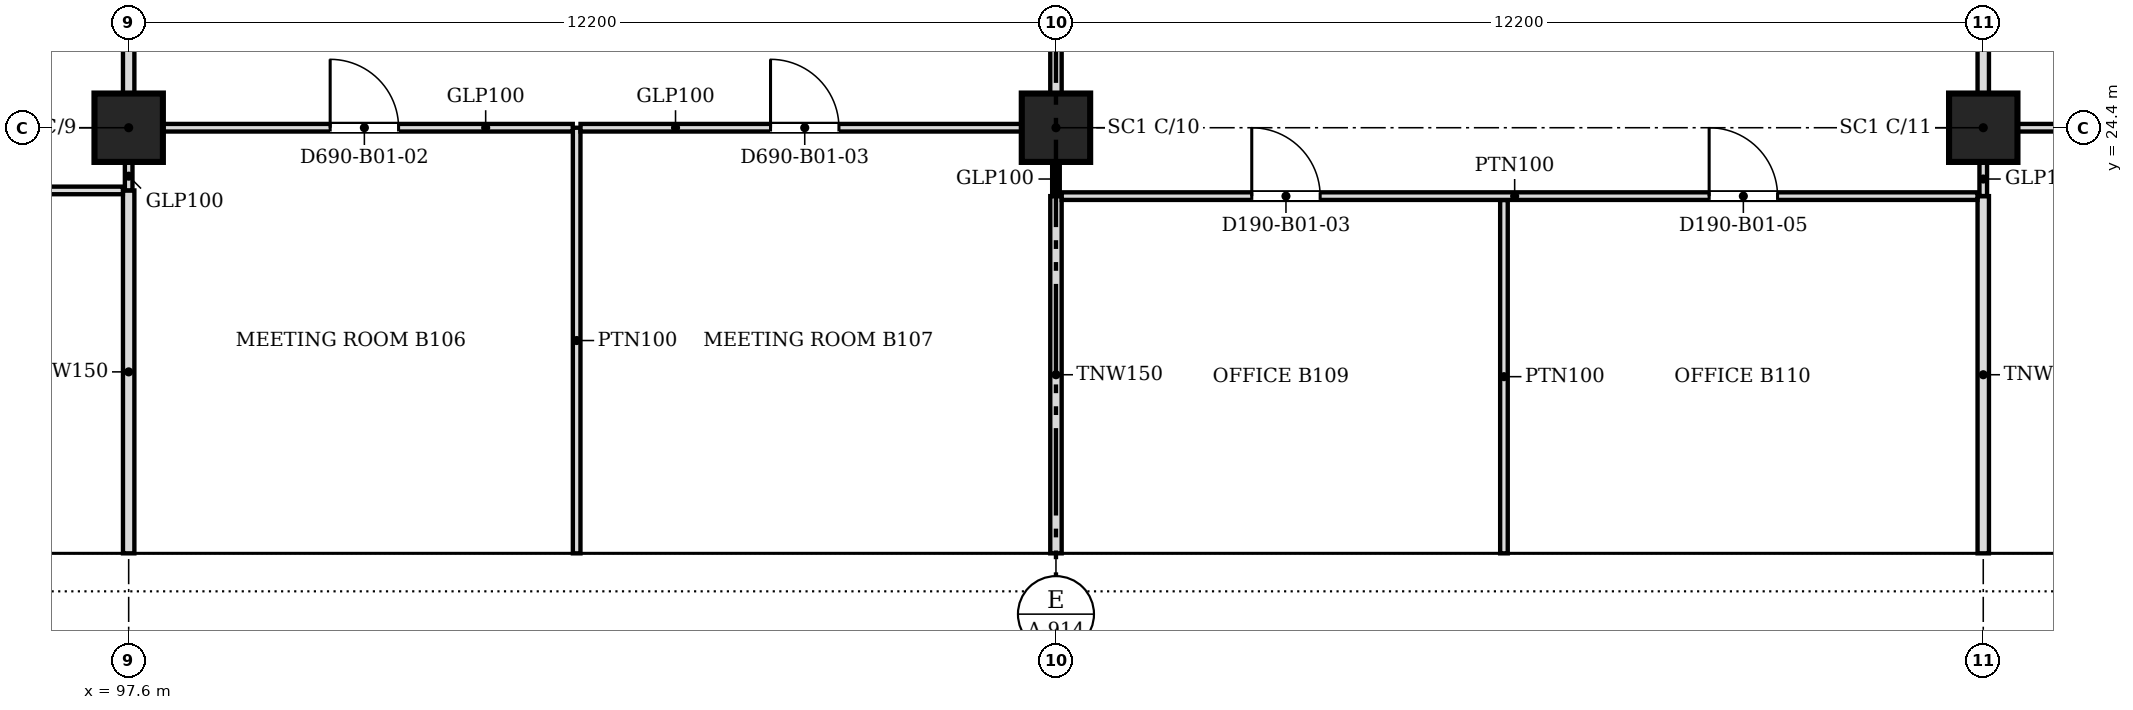
"""IFC4 building model, lengths in metres.
Left out: names, types, materials, properties, quantities, classifications, styles, units other than length and angle.
Written with IfcOpenShell. Run it as: python <this file> out.ifc"""

import sys

from ifc_helpers import new_model, si_unit, direction, frame, frame_2d, origin, origin_2d, place, context, subcontext, project, spatial, polyline, rectangle, outline, extrude, faceted_brep, source, transform, mapped, element, fill, save


model = new_model("IFC4")
c1 = context("Model", 3, precision=1e-05, world=origin(), true_north=direction((0.0, 1.0)))
c2 = subcontext(c1, "Body", "Model", "MODEL_VIEW")
j1 = project(units=[si_unit("LENGTHUNIT", "METRE"), si_unit("PLANEANGLEUNIT", "RADIAN")], contexts=[c1])
p1 = place(None, origin())
s1 = spatial("IfcSite", under=j1, at=p1, CompositionType="ELEMENT")
p2 = place(p1, origin())
s2 = spatial("IfcBuilding", under=s1, at=p2, CompositionType="ELEMENT")
p3 = place(p2, frame((0.0, 0.0, 16.8)))
s3 = spatial("IfcBuildingStorey", under=s2, at=p3, CompositionType="ELEMENT", Elevation=16.8)
for number, where, z_axis, x_axis in (
    (1, (97.6, 24.4, 0.0), (0.0, 0.0, 1.0), (1.0, 0.0, 0.0)),
    (2, (109.8, 24.4, 0.0), (0.0, 0.0, 1.0), (1.0, 0.0, 0.0)),
    (3, (122.0, 24.4, 0.0), (0.0, 0.0, 1.0), (1.0, 0.0, 0.0)),
):
    element("IfcColumn", number, at=place(p3, frame(where, z_axis=z_axis, x_axis=x_axis)), inside=s3, PredefinedType="COLUMN", context=c2, shape_type="SweptSolid", body=[
        extrude(rectangle(XDim=0.9, YDim=0.9, at=origin_2d()), origin(), (0.0, 0.0, 1.0), 4.3),
    ])
m1 = source(origin(), c2, "Body", "Brep", [
    faceted_brep([(6.1, -0.25, 0.0), (3.05, -0.25, 4.5), (0.0, -0.25, 0.0), (6.1, -0.25, 0.0), (0.0, 0.25, 0.0), (3.05, 0.25, 4.5), (6.1, 0.25, 0.0), (6.1, 0.25, 0.0)], [[[0, 1, 2, 3]], [[4, 5, 6, 7]], [[6, 5, 1, 0]], [[5, 4, 2, 1]], [[4, 7, 3, 2]], [[3, 7, 6, 0]]]),
])
p4 = place(p3, frame((94.55, 18.55, 0.0), z_axis=(0.0, 0.0, 1.0), x_axis=(1.0, 0.0, 0.0)))
e4 = element("IfcWall", 4, at=p4, inside=s3, PredefinedType="SOLIDWALL", context=c2, shape_type="MappedRepresentation", body=[
    mapped(m1, transform((0.0, 0.0, 0.0), scale=1.0)),
])
m2 = source(origin(), c2, "Body", "SweptSolid", [
    extrude(outline(polyline([(5.629, 0.25), (3.05, 4.054), (0.471, 0.25), (5.629, 0.25)])), frame((0.0, 0.26, 0.0), z_axis=(0.0, -1.0, 0.0), x_axis=(1.0, 0.0, 0.0)), (0.0, 0.0, 1.0), 0.52),
])
p5 = place(p4, origin())
e5 = element("IfcOpeningElement", 5, at=p5, cuts=e4, PredefinedType="OPENING", context=c2, shape_type="MappedRepresentation", body=[
    mapped(m2, transform((0.0, 0.0, 0.0), scale=1.0)),
])
m3 = source(origin(), c2, "Body", "SweptSolid", [
    extrude(outline(polyline([(6.1, 0.0), (3.05, 4.5), (0.0, 0.0), (6.1, 0.0)])), frame((0.0, 0.25, 0.0), z_axis=(0.0, -1.0, 0.0), x_axis=(1.0, 0.0, 0.0)), (0.0, 0.0, 1.0), 0.5),
])
p6 = place(p3, frame((100.65, 18.55, 0.0), z_axis=(0.0, 0.0, 1.0), x_axis=(1.0, 0.0, 0.0)))
e6 = element("IfcWall", 6, at=p6, inside=s3, PredefinedType="SOLIDWALL", context=c2, shape_type="MappedRepresentation", body=[
    mapped(m3, transform((0.0, 0.0, 0.0), scale=1.0)),
])
p7 = place(p6, origin())
e7 = element("IfcOpeningElement", 7, at=p7, cuts=e6, PredefinedType="OPENING", context=c2, shape_type="MappedRepresentation", body=[
    mapped(m2, transform((0.0, 0.0, 0.0), scale=1.0)),
])
p8 = place(p3, frame((106.75, 18.55, 0.0), z_axis=(0.0, 0.0, 1.0), x_axis=(1.0, 0.0, 0.0)))
e8 = element("IfcWall", 8, at=p8, inside=s3, PredefinedType="SOLIDWALL", context=c2, shape_type="MappedRepresentation", body=[
    mapped(m3, transform((0.0, 0.0, 0.0), scale=1.0)),
])
p9 = place(p8, origin())
e9 = element("IfcOpeningElement", 9, at=p9, cuts=e8, PredefinedType="OPENING", context=c2, shape_type="MappedRepresentation", body=[
    mapped(m2, transform((0.0, 0.0, 0.0), scale=1.0)),
])
p10 = place(p3, frame((112.85, 18.55, 0.0), z_axis=(0.0, 0.0, 1.0), x_axis=(1.0, 0.0, 0.0)))
e10 = element("IfcWall", 10, at=p10, inside=s3, PredefinedType="SOLIDWALL", context=c2, shape_type="MappedRepresentation", body=[
    mapped(m1, transform((0.0, 0.0, 0.0), scale=1.0)),
])
p11 = place(p10, origin())
e11 = element("IfcOpeningElement", 11, at=p11, cuts=e10, PredefinedType="OPENING", context=c2, shape_type="MappedRepresentation", body=[
    mapped(m2, transform((0.0, 0.0, 0.0), scale=1.0)),
])
p12 = place(p3, frame((118.95, 18.55, 0.0), z_axis=(0.0, 0.0, 1.0), x_axis=(1.0, 0.0, 0.0)))
e12 = element("IfcWall", 12, at=p12, inside=s3, PredefinedType="SOLIDWALL", context=c2, shape_type="MappedRepresentation", body=[
    mapped(m3, transform((0.0, 0.0, 0.0), scale=1.0)),
])
p13 = place(p12, origin())
e13 = element("IfcOpeningElement", 13, at=p13, cuts=e12, PredefinedType="OPENING", context=c2, shape_type="MappedRepresentation", body=[
    mapped(m2, transform((0.0, 0.0, 0.0), scale=1.0)),
])
p14 = place(p2, frame((0.0, 0.0, 21.3)))
s4 = spatial("IfcBuildingStorey", under=s2, at=p14, CompositionType="ELEMENT", Elevation=21.3)
m4 = source(origin(), c2, "Body", "Brep", [
    faceted_brep([(3.003, -0.25, 0.0), (6.053, -0.25, 4.5), (3.003, -0.25, 9.0), (0.0, -0.25, 4.5), (0.047, 0.25, 4.57), (3.003, 0.25, 9.0), (6.053, 0.25, 4.5), (3.003, 0.25, 0.0), (0.047, 0.25, 4.43), (0.0, 0.0, 4.5)], [[[0, 1, 2, 3]], [[4, 5, 6, 7, 8]], [[7, 6, 1, 0]], [[6, 5, 2, 1]], [[5, 4, 9, 3, 2]], [[8, 7, 0, 3, 9]], [[8, 9, 4]]]),
])
p15 = place(p14, frame((91.547, 18.55, -4.5), z_axis=(0.0, 0.0, 1.0), x_axis=(1.0, 0.0, 0.0)))
e14 = element("IfcWall", 14, at=p15, inside=s4, PredefinedType="SOLIDWALL", context=c2, shape_type="MappedRepresentation", body=[
    mapped(m4, transform((0.0, 0.0, 0.0), scale=1.0)),
])
m5 = source(origin(), c2, "Body", "SweptSolid", [
    extrude(outline(polyline([(3.005, 0.448), (5.751, 4.5), (3.005, 8.552), (0.301, 4.5), (3.005, 0.448)])), frame((0.0, 0.26, 0.0), z_axis=(0.0, -1.0, 0.0), x_axis=(1.0, 0.0, 0.0)), (0.0, 0.0, 1.0), 0.52),
])
p16 = place(p15, origin())
e15 = element("IfcOpeningElement", 15, at=p16, cuts=e14, PredefinedType="OPENING", context=c2, shape_type="MappedRepresentation", body=[
    mapped(m5, transform((0.0, 0.0, 0.0), scale=1.0)),
])
m6 = source(origin(), c2, "Body", "Brep", [
    faceted_brep([(3.05, -0.25, 0.0), (6.1, -0.25, 4.5), (6.1, -0.25, 4.5), (3.05, -0.25, 9.0), (0.0, -0.25, 4.5), (0.0, 0.25, 4.5), (3.05, 0.25, 9.0), (6.1, 0.25, 4.5), (6.1, 0.25, 4.5), (3.05, 0.25, 0.0)], [[[0, 1, 2, 3, 4]], [[5, 6, 7, 8, 9]], [[9, 8, 1, 0]], [[7, 6, 3, 2]], [[6, 5, 4, 3]], [[5, 9, 0, 4]], [[1, 8, 7, 2]]]),
])
p17 = place(p14, frame((97.6, 18.55, -4.5), z_axis=(0.0, 0.0, 1.0), x_axis=(1.0, 0.0, 0.0)))
e16 = element("IfcWall", 16, at=p17, inside=s4, PredefinedType="SOLIDWALL", context=c2, shape_type="MappedRepresentation", body=[
    mapped(m6, transform((0.0, 0.0, 0.0), scale=1.0)),
])
m7 = source(origin(), c2, "Body", "SweptSolid", [
    extrude(outline(polyline([(3.05, 0.446), (5.798, 4.5), (3.05, 8.554), (0.302, 4.5), (3.05, 0.446)])), frame((0.0, 0.26, 0.0), z_axis=(0.0, -1.0, 0.0), x_axis=(1.0, 0.0, 0.0)), (0.0, 0.0, 1.0), 0.52),
])
p18 = place(p17, origin())
e17 = element("IfcOpeningElement", 17, at=p18, cuts=e16, PredefinedType="OPENING", context=c2, shape_type="MappedRepresentation", body=[
    mapped(m7, transform((0.0, 0.0, 0.0), scale=1.0)),
])
m8 = source(origin(), c2, "Body", "SweptSolid", [
    extrude(outline(polyline([(3.05, 0.0), (6.1, 4.5), (3.05, 9.0), (0.0, 4.5), (3.05, 0.0)])), frame((0.0, 0.25, 0.0), z_axis=(0.0, -1.0, 0.0), x_axis=(1.0, 0.0, 0.0)), (0.0, 0.0, 1.0), 0.5),
])
p19 = place(p14, frame((103.7, 18.55, -4.5), z_axis=(0.0, 0.0, 1.0), x_axis=(1.0, 0.0, 0.0)))
e18 = element("IfcWall", 18, at=p19, inside=s4, PredefinedType="SOLIDWALL", context=c2, shape_type="MappedRepresentation", body=[
    mapped(m8, transform((0.0, 0.0, 0.0), scale=1.0)),
])
p20 = place(p19, origin())
e19 = element("IfcOpeningElement", 19, at=p20, cuts=e18, PredefinedType="OPENING", context=c2, shape_type="MappedRepresentation", body=[
    mapped(m7, transform((0.0, 0.0, 0.0), scale=1.0)),
])
p21 = place(p14, frame((109.8, 18.55, -4.5), z_axis=(0.0, 0.0, 1.0), x_axis=(1.0, 0.0, 0.0)))
e20 = element("IfcWall", 20, at=p21, inside=s4, PredefinedType="SOLIDWALL", context=c2, shape_type="MappedRepresentation", body=[
    mapped(m6, transform((0.0, 0.0, 0.0), scale=1.0)),
])
p22 = place(p21, origin())
e21 = element("IfcOpeningElement", 21, at=p22, cuts=e20, PredefinedType="OPENING", context=c2, shape_type="MappedRepresentation", body=[
    mapped(m7, transform((0.0, 0.0, 0.0), scale=1.0)),
])
p23 = place(p14, frame((115.9, 18.55, -4.5), z_axis=(0.0, 0.0, 1.0), x_axis=(1.0, 0.0, 0.0)))
e22 = element("IfcWall", 22, at=p23, inside=s4, PredefinedType="SOLIDWALL", context=c2, shape_type="MappedRepresentation", body=[
    mapped(m8, transform((0.0, 0.0, 0.0), scale=1.0)),
])
p24 = place(p23, origin())
e23 = element("IfcOpeningElement", 23, at=p24, cuts=e22, PredefinedType="OPENING", context=c2, shape_type="MappedRepresentation", body=[
    mapped(m7, transform((0.0, 0.0, 0.0), scale=1.0)),
])
m9 = source(origin(), c2, "Body", "Brep", [
    faceted_brep([(3.05, -0.25, 0.0), (6.053, -0.25, 4.5), (3.05, -0.25, 9.0), (0.0, -0.25, 4.5), (0.0, 0.25, 4.5), (3.05, 0.25, 9.0), (6.007, 0.25, 4.57), (6.007, 0.25, 4.43), (3.05, 0.25, 0.0), (6.053, 0.0, 4.5)], [[[0, 1, 2, 3]], [[4, 5, 6, 7, 8]], [[8, 7, 9, 1, 0]], [[6, 5, 2, 1, 9]], [[5, 4, 3, 2]], [[4, 8, 0, 3]], [[9, 7, 6]]]),
])
p25 = place(p14, frame((122.0, 18.55, -4.5), z_axis=(0.0, 0.0, 1.0), x_axis=(1.0, 0.0, 0.0)))
e24 = element("IfcWall", 24, at=p25, inside=s4, PredefinedType="SOLIDWALL", context=c2, shape_type="MappedRepresentation", body=[
    mapped(m9, transform((0.0, 0.0, 0.0), scale=1.0)),
])
m10 = source(origin(), c2, "Body", "SweptSolid", [
    extrude(outline(polyline([(3.048, 0.448), (5.753, 4.5), (3.048, 8.552), (0.302, 4.5), (3.048, 0.448)])), frame((0.0, 0.26, 0.0), z_axis=(0.0, -1.0, 0.0), x_axis=(1.0, 0.0, 0.0)), (0.0, 0.0, 1.0), 0.52),
])
p26 = place(p25, origin())
e25 = element("IfcOpeningElement", 25, at=p26, cuts=e24, PredefinedType="OPENING", context=c2, shape_type="MappedRepresentation", body=[
    mapped(m10, transform((0.0, 0.0, 0.0), scale=1.0)),
])
p27 = place(p3, frame((97.6, 18.8, 0.0), z_axis=(0.0, 0.0, 1.0), x_axis=(0.0, 1.0, 0.0)))
e26 = element("IfcWall", 26, at=p27, inside=s3, PredefinedType="PARTITIONING", context=c2, shape_type="SweptSolid", body=[
    extrude(rectangle(XDim=4.775, YDim=0.15, at=frame_2d((2.387, 0.0))), origin(), (0.0, 0.0, 1.0), 3.415),
])
p28 = place(p3, frame((103.494, 18.8, 0.0), z_axis=(0.0, 0.0, 1.0), x_axis=(0.0, 1.0, 0.0)))
e27 = element("IfcWall", 27, at=p28, inside=s3, PredefinedType="PARTITIONING", context=c2, shape_type="SweptSolid", body=[
    extrude(rectangle(XDim=5.6, YDim=0.1, at=frame_2d((2.8, 0.0))), origin(), (0.0, 0.0, 1.0), 3.415),
])
p29 = place(p3, frame((109.8, 18.8, 0.0), z_axis=(0.0, 0.0, 1.0), x_axis=(0.0, 1.0, 0.0)))
e28 = element("IfcWall", 28, at=p29, inside=s3, PredefinedType="PARTITIONING", context=c2, shape_type="SweptSolid", body=[
    extrude(rectangle(XDim=4.7, YDim=0.15, at=frame_2d((2.35, 0.0))), origin(), (0.0, 0.0, 1.0), 3.415),
])
p30 = place(p3, frame((115.694, 18.8, 0.0), z_axis=(0.0, 0.0, 1.0), x_axis=(0.0, 1.0, 0.0)))
e29 = element("IfcWall", 29, at=p30, inside=s3, PredefinedType="PARTITIONING", context=c2, shape_type="SweptSolid", body=[
    extrude(rectangle(XDim=4.649, YDim=0.1, at=frame_2d((2.324, 0.0))), origin(), (0.0, 0.0, 1.0), 3.415),
])
p31 = place(p3, frame((122.0, 18.8, 0.0), z_axis=(0.0, 0.0, 1.0), x_axis=(0.0, 1.0, 0.0)))
e30 = element("IfcWall", 30, at=p31, inside=s3, PredefinedType="PARTITIONING", context=c2, shape_type="SweptSolid", body=[
    extrude(rectangle(XDim=4.7, YDim=0.15, at=frame_2d((2.35, 0.0))), origin(), (0.0, 0.0, 1.0), 3.415),
])
p32 = place(p3, frame((109.8, 23.501, 0.0), z_axis=(0.0, 0.0, 1.0), x_axis=(0.0, 1.0, 0.0)))
e31 = element("IfcWall", 31, at=p32, inside=s3, PredefinedType="PARTITIONING", context=c2, shape_type="SweptSolid", body=[
    extrude(rectangle(XDim=0.448, YDim=0.1, at=frame_2d((0.224, 0.0))), origin(), (0.0, 0.0, 1.0), 3.415),
])
p33 = place(p3, frame((121.924, 23.5, 0.0), z_axis=(0.0, 0.0, 1.0), x_axis=(-1.0, 0.0, 0.0)))
e32 = element("IfcWall", 32, at=p33, inside=s3, PredefinedType="PARTITIONING", context=c2, shape_type="SweptSolid", body=[
    extrude(rectangle(XDim=12.048, YDim=0.1, at=frame_2d((6.024, 0.0))), origin(), (0.0, 0.0, 1.0), 3.415),
])
m11 = source(origin(), c2, "Body", "SweptSolid", [
    extrude(rectangle(XDim=0.9, YDim=2.1, at=frame_2d((0.45, 1.05))), frame((0.0, 0.06, 0.0), z_axis=(0.0, -1.0, 0.0), x_axis=(1.0, 0.0, 0.0)), (0.0, 0.0, 1.0), 0.12),
])
p34 = place(p33, frame((8.648, 0.0, 0.0)))
e33 = element("IfcOpeningElement", 33, at=p34, cuts=e32, PredefinedType="OPENING", context=c2, shape_type="MappedRepresentation", body=[
    mapped(m11, transform((0.0, 0.0, 0.0), scale=1.0)),
])
p35 = place(p33, frame((2.63, 0.0, 0.0)))
e34 = element("IfcOpeningElement", 34, at=p35, cuts=e32, PredefinedType="OPENING", context=c2, shape_type="MappedRepresentation", body=[
    mapped(m11, transform((0.0, 0.0, 0.0), scale=1.0)),
])
p36 = place(p3, frame((122.0, 23.501, 0.0), z_axis=(0.0, 0.0, 1.0), x_axis=(0.0, 1.0, 0.0)))
e35 = element("IfcWall", 35, at=p36, inside=s3, PredefinedType="PARTITIONING", context=c2, shape_type="SweptSolid", body=[
    extrude(rectangle(XDim=0.448, YDim=0.1, at=frame_2d((0.224, 0.0))), origin(), (0.0, 0.0, 1.0), 3.415),
])
p37 = place(p3, frame((97.524, 23.575, 0.0), z_axis=(0.0, 0.0, 1.0), x_axis=(-1.0, 0.0, 0.0)))
e36 = element("IfcWall", 36, at=p37, inside=s3, PredefinedType="PARTITIONING", context=c2, shape_type="SweptSolid", body=[
    extrude(rectangle(XDim=11.27, YDim=0.1, at=frame_2d((5.635, 0.0))), origin(), (0.0, 0.0, 1.0), 3.415),
])
p38 = place(p37, frame((8.17, 0.0, 0.0)))
e37 = element("IfcOpeningElement", 37, at=p38, cuts=e36, PredefinedType="OPENING", context=c2, shape_type="MappedRepresentation", body=[
    mapped(m11, transform((0.0, 0.0, 0.0), scale=1.0)),
])
p39 = place(p37, frame((2.572, 0.0, 0.0)))
e38 = element("IfcOpeningElement", 38, at=p39, cuts=e36, PredefinedType="OPENING", context=c2, shape_type="MappedRepresentation", body=[
    mapped(m11, transform((0.0, 0.0, 0.0), scale=1.0)),
])
p40 = place(p3, frame((97.6, 23.576, 0.0), z_axis=(0.0, 0.0, 1.0), x_axis=(0.0, 1.0, 0.0)))
e39 = element("IfcWall", 39, at=p40, inside=s3, PredefinedType="PARTITIONING", context=c2, shape_type="SweptSolid", body=[
    extrude(rectangle(XDim=0.373, YDim=0.1, at=frame_2d((0.187, 0.0))), origin(), (0.0, 0.0, 1.0), 3.415),
])
p41 = place(p3, frame((103.443, 24.4, 0.0), z_axis=(0.0, 0.0, 1.0), x_axis=(-1.0, 0.0, 0.0)))
e40 = element("IfcWall", 40, at=p41, inside=s3, PredefinedType="PARTITIONING", context=c2, shape_type="SweptSolid", body=[
    extrude(rectangle(XDim=5.392, YDim=0.1, at=frame_2d((2.696, 0.0))), origin(), (0.0, 0.0, 1.0), 3.415),
])
p42 = place(p41, frame((2.292, 0.0, 0.0)))
e41 = element("IfcOpeningElement", 41, at=p42, cuts=e40, PredefinedType="OPENING", context=c2, shape_type="MappedRepresentation", body=[
    mapped(m11, transform((0.0, 0.0, 0.0), scale=1.0)),
])
p43 = place(p3, frame((109.349, 24.4, 0.0), z_axis=(0.0, 0.0, 1.0), x_axis=(-1.0, 0.0, 0.0)))
e42 = element("IfcWall", 42, at=p43, inside=s3, PredefinedType="PARTITIONING", context=c2, shape_type="SweptSolid", body=[
    extrude(rectangle(XDim=5.804, YDim=0.1, at=frame_2d((2.902, 0.0))), origin(), (0.0, 0.0, 1.0), 3.415),
])
p44 = place(p43, frame((2.404, 0.0, 0.0)))
e43 = element("IfcOpeningElement", 43, at=p44, cuts=e42, PredefinedType="OPENING", context=c2, shape_type="MappedRepresentation", body=[
    mapped(m11, transform((0.0, 0.0, 0.0), scale=1.0)),
])
p45 = place(p3, frame((128.524, 24.4, 0.0), z_axis=(0.0, 0.0, 1.0), x_axis=(-1.0, 0.0, 0.0)))
e44 = element("IfcWall", 44, at=p45, inside=s3, PredefinedType="PARTITIONING", context=c2, shape_type="SweptSolid", body=[
    extrude(rectangle(XDim=6.073, YDim=0.1, at=frame_2d((3.037, 0.0))), origin(), (0.0, 0.0, 1.0), 3.415),
])
p46 = place(p45, frame((2.573, 0.0, 0.0)))
e45 = element("IfcOpeningElement", 45, at=p46, cuts=e44, PredefinedType="OPENING", context=c2, shape_type="MappedRepresentation", body=[
    mapped(m11, transform((0.0, 0.0, 0.0), scale=1.0)),
])
for number, where, z_axis, x_axis in (
    (46, (97.6, 24.851, 0.0), (0.0, 0.0, 1.0), (0.0, 1.0, 0.0)),
    (47, (109.8, 24.851, 0.0), (0.0, 0.0, 1.0), (0.0, 1.0, 0.0)),
    (48, (122.0, 24.851, 0.0), (0.0, 0.0, 1.0), (0.0, 1.0, 0.0)),
):
    element("IfcWall", number, at=place(p3, frame(where, z_axis=z_axis, x_axis=x_axis)), inside=s3, PredefinedType="PARTITIONING", context=c2, shape_type="SweptSolid", body=[
        extrude(rectangle(XDim=9.273, YDim=0.15, at=frame_2d((4.636, 0.0))), origin(), (0.0, 0.0, 1.0), 3.415),
    ])
m12 = source(origin(), c2, "Body", "SweptSolid", [
    extrude(rectangle(XDim=0.9, YDim=2.1, at=frame_2d((0.45, 1.05))), frame((0.0, 0.025, 0.0), z_axis=(0.0, -1.0, 0.0), x_axis=(1.0, 0.0, 0.0)), (0.0, 0.0, 1.0), 0.05),
])
p47 = place(p42, origin())
e49 = element("IfcDoor", 49, at=p47, inside=s3, OperationType="SINGLE_SWING_RIGHT", PredefinedType="DOOR", context=c2, shape_type="MappedRepresentation", body=[
    mapped(m12, transform((0.0, 0.0, 0.0), scale=1.0)),
])
fill(e41, e49)
p48 = place(p44, origin())
e50 = element("IfcDoor", 50, at=p48, inside=s3, OperationType="SINGLE_SWING_RIGHT", PredefinedType="DOOR", context=c2, shape_type="MappedRepresentation", body=[
    mapped(m12, transform((0.0, 0.0, 0.0), scale=1.0)),
])
fill(e43, e50)
p49 = place(p34, origin())
e51 = element("IfcDoor", 51, at=p49, inside=s3, OperationType="SINGLE_SWING_RIGHT", PredefinedType="DOOR", context=c2, shape_type="MappedRepresentation", body=[
    mapped(m12, transform((0.0, 0.0, 0.0), scale=1.0)),
])
fill(e33, e51)
p50 = place(p35, origin())
e52 = element("IfcDoor", 52, at=p50, inside=s3, OperationType="SINGLE_SWING_RIGHT", PredefinedType="DOOR", context=c2, shape_type="MappedRepresentation", body=[
    mapped(m12, transform((0.0, 0.0, 0.0), scale=1.0)),
])
fill(e34, e52)
save(model, sys.argv[1])
